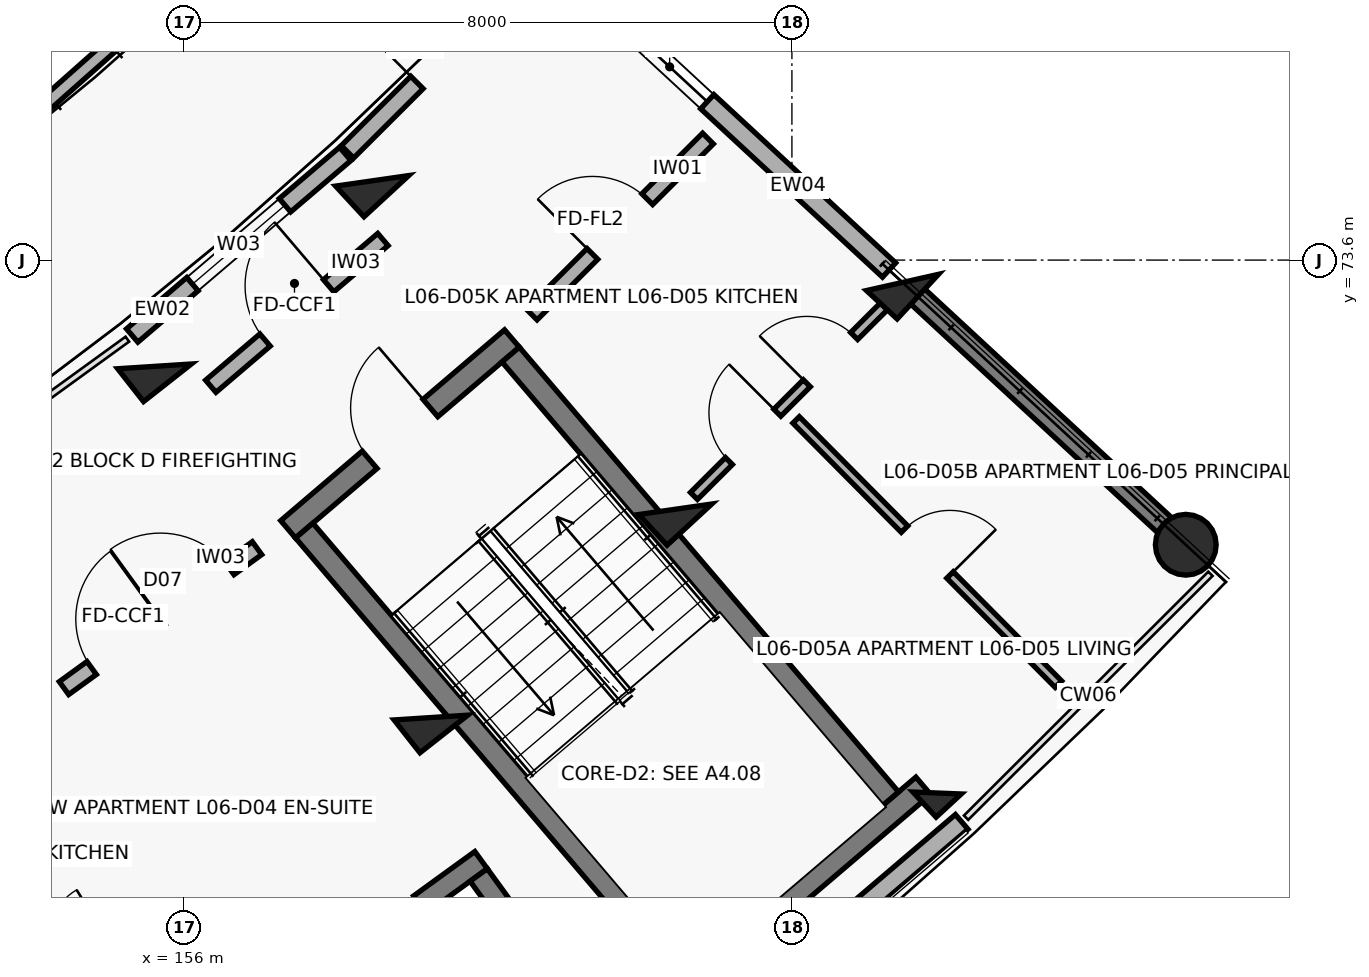
"""IFC4 building model, lengths in metres.
Left out: names, types, materials, properties, quantities, classifications, styles, units other than length and angle.
Written with IfcOpenShell. Run it as: python <this file> out.ifc"""

import sys

from ifc_helpers import new_model, si_unit, direction, frame, frame_2d, origin, origin_2d, place, context, subcontext, project, spatial, rectangle, circle, extrude, element, fill, save


model = new_model("IFC4")
c1 = context("Model", 3, precision=1e-05, world=origin(), true_north=direction((0.0, 1.0)))
c2 = subcontext(c1, "Body", "Model", "MODEL_VIEW")
j1 = project(units=[si_unit("LENGTHUNIT", "METRE"), si_unit("PLANEANGLEUNIT", "RADIAN")], contexts=[c1])
p1 = place(None, origin())
s1 = spatial("IfcSite", under=j1, at=p1, CompositionType="ELEMENT")
p2 = place(p1, origin())
s2 = spatial("IfcBuilding", under=s1, at=p2, CompositionType="ELEMENT")
p3 = place(p2, frame((0.0, 0.0, 20.5)))
s3 = spatial("IfcBuildingStorey", under=s2, at=p3, CompositionType="ELEMENT", Elevation=20.5)
for number, where, z_axis, x_axis in (
    (1, (155.831, 65.101, 0.0), (0.0, 0.0, 1.0), (0.555, -0.832, 0.0)),
    (2, (155.614, 72.202, 0.0), (0.0, 0.0, 1.0), (0.618, -0.786, 0.0)),
    (3, (159.25, 67.581, 0.0), (0.0, 0.0, 1.0), (0.618, -0.786, 0.0)),
    (4, (158.477, 74.643, 0.0), (0.0, 0.0, 1.0), (0.678, -0.735, 0.0)),
    (5, (162.465, 70.322, 0.0), (0.0, 0.0, 1.0), (0.678, -0.735, 0.0)),
):
    element("IfcColumn", number, at=place(p3, frame(where, z_axis=z_axis, x_axis=x_axis)), inside=s3, PredefinedType="COLUMN", context=c2, shape_type="SweptSolid", body=[
        extrude(rectangle(XDim=0.55, YDim=0.8, at=origin_2d()), origin(), (0.0, 0.0, 1.0), 3.1),
    ])
p4 = place(p3, frame((165.91, 66.588, 0.0), z_axis=(0.0, 0.0, 1.0), x_axis=(0.678159669868, -0.73491459515, 0.0)))
e6 = element("IfcColumn", 6, at=p4, inside=s3, PredefinedType="COLUMN", context=c2, shape_type="SweptSolid", body=[
    extrude(rectangle(XDim=0.45, YDim=0.45, at=origin_2d()), origin(), (0.0, 0.0, 1.0), 3.1),
])
p5 = place(p3, frame((165.455, 73.306, 0.0), z_axis=(0.0, 0.0, 1.0), x_axis=(0.733729864503, -0.679441304262, 0.0)))
e7 = element("IfcColumn", 7, at=p5, inside=s3, PredefinedType="COLUMN", context=c2, shape_type="SweptSolid", body=[
    extrude(rectangle(XDim=0.55, YDim=0.8, at=origin_2d()), origin(), (0.0, 0.0, 1.0), 3.1),
])
p6 = place(p3, frame((169.182, 69.854, 0.0), z_axis=(0.0, 0.0, 1.0), x_axis=(0.733729864503, -0.679441304262, 0.0)))
e8 = element("IfcColumn", 8, at=p6, inside=s3, PredefinedType="COLUMN", context=c2, shape_type="SweptSolid", body=[
    extrude(circle(Radius=0.4, at=origin_2d()), origin(), (0.0, 0.0, 1.0), 3.1),
])
p7 = place(p3, frame((165.587, 73.184, 0.0), z_axis=(0.0, 0.0, 1.0), x_axis=(0.733739663667, -0.679430721974, 0.0)))
e9 = element("IfcWall", 9, at=p7, inside=s3, PredefinedType="SHEAR", context=c2, shape_type="SweptSolid", body=[
    extrude(rectangle(XDim=4.72, YDim=0.27, at=frame_2d((2.36, 0.0))), origin(), (0.0, 0.0, 1.0), 2.86),
])
p8 = place(p3, frame((162.716, 63.209, 0.0), z_axis=(0.0, 0.0, 1.0), x_axis=(0.760968923704, 0.64878833001, 0.0)))
e10 = element("IfcWall", 10, at=p8, inside=s3, PredefinedType="SOLIDWALL", context=c2, shape_type="SweptSolid", body=[
    extrude(rectangle(XDim=4.623, YDim=0.255, at=frame_2d((2.311, 0.0))), origin(), (0.0, 0.0, 1.0), 2.25),
])
p9 = place(p3, frame((155.32, 72.608, 0.0), z_axis=(0.0, 0.0, 1.0), x_axis=(0.760985049259, 0.648769415743, 0.0)))
e11 = element("IfcWall", 11, at=p9, inside=s3, PredefinedType="SOLIDWALL", context=c2, shape_type="SweptSolid", body=[
    extrude(rectangle(XDim=3.683, YDim=0.23, at=frame_2d((1.842, 0.0))), origin(), (0.0, 0.0, 1.0), 2.25),
])
p10 = place(p9, frame((1.042, 0.0, 0.32)))
e12 = element("IfcOpeningElement", 12, at=p10, cuts=e11, PredefinedType="OPENING", context=c2, shape_type="SweptSolid", body=[
    extrude(rectangle(XDim=1.6, YDim=1.5, at=frame_2d((0.8, 0.75))), frame((0.0, 0.125, 0.0), z_axis=(0.0, -1.0, 0.0), x_axis=(1.0, 0.0, 0.0)), (0.0, 0.0, 1.0), 0.25),
])
p11 = place(p3, frame((158.153, 75.024, 0.0), z_axis=(0.0, 0.0, 1.0), x_axis=(0.707703076116, 0.706509982984, 0.0)))
e13 = element("IfcWall", 13, at=p11, inside=s3, PredefinedType="SOLIDWALL", context=c2, shape_type="SweptSolid", body=[
    extrude(rectangle(XDim=3.683, YDim=0.23, at=frame_2d((1.842, 0.0))), origin(), (0.0, 0.0, 1.0), 2.25),
])
p12 = place(p11, frame((1.292, 0.0, 0.0)))
e14 = element("IfcOpeningElement", 14, at=p12, cuts=e13, PredefinedType="OPENING", context=c2, shape_type="SweptSolid", body=[
    extrude(rectangle(XDim=1.1, YDim=2.15, at=frame_2d((0.55, 1.075))), frame((0.0, 0.125, 0.0), z_axis=(0.0, -1.0, 0.0), x_axis=(1.0, 0.0, 0.0)), (0.0, 0.0, 1.0), 0.25),
])
p13 = place(p3, frame((161.316, 77.138, 0.0), z_axis=(0.0, 0.0, 1.0), x_axis=(0.733734795505, -0.679435979225, 0.0)))
e15 = element("IfcWall", 15, at=p13, inside=s3, PredefinedType="SOLIDWALL", context=c2, shape_type="SweptSolid", body=[
    extrude(rectangle(XDim=5.4, YDim=0.255, at=frame_2d((2.7, 0.0))), origin(), (0.0, 0.0, 1.0), 2.18),
])
p14 = place(p13, frame((0.79, 0.0, 0.75)))
e16 = element("IfcOpeningElement", 16, at=p14, cuts=e15, PredefinedType="OPENING", context=c2, shape_type="SweptSolid", body=[
    extrude(rectangle(XDim=1.35, YDim=1.35, at=frame_2d((0.675, 0.675))), frame((0.0, 0.137, 0.0), z_axis=(0.0, -1.0, 0.0), x_axis=(1.0, 0.0, 0.0)), (0.0, 0.0, 1.0), 0.275),
])
p15 = place(p3, frame((152.117, 73.82, 0.0), z_axis=(0.0, 0.0, 1.0), x_axis=(0.74809726033, 0.66358909657, 0.0)))
e17 = element("IfcWall", 17, at=p15, inside=s3, PredefinedType="PARAPET", context=c2, shape_type="SweptSolid", body=[
    extrude(rectangle(XDim=8.728, YDim=0.18, at=frame_2d((4.364, 0.0))), origin(), (0.0, 0.0, 1.0), 0.25),
])
p16 = place(p3, frame((157.372, 70.058, 0.0), z_axis=(0.0, 0.0, 1.0), x_axis=(0.760990583254, 0.648762924495, 0.0)))
e18 = element("IfcWall", 18, at=p16, inside=s3, PredefinedType="SHEAR", context=c2, shape_type="SweptSolid", body=[
    extrude(rectangle(XDim=3.87, YDim=0.3, at=frame_2d((1.935, 0.0))), origin(), (0.0, 0.0, 1.0), 3.1),
])
p17 = place(p16, frame((1.41, 0.0, 0.0)))
e19 = element("IfcOpeningElement", 19, at=p17, cuts=e18, PredefinedType="OPENING", context=c2, shape_type="SweptSolid", body=[
    extrude(rectangle(XDim=1.05, YDim=2.15, at=frame_2d((0.525, 1.075))), frame((0.0, 0.16, 0.0), z_axis=(0.0, -1.0, 0.0), x_axis=(1.0, 0.0, 0.0)), (0.0, 0.0, 1.0), 0.32),
])
p18 = place(p3, frame((162.327, 63.783, 0.0), z_axis=(0.0, 0.0, 1.0), x_axis=(0.760969560012, 0.648787583678, 0.0)))
e20 = element("IfcWall", 20, at=p18, inside=s3, PredefinedType="SHEAR", context=c2, shape_type="SweptSolid", body=[
    extrude(rectangle(XDim=4.47, YDim=0.3, at=frame_2d((2.235, 0.0))), origin(), (0.0, 0.0, 1.0), 3.1),
])
p19 = place(p3, frame((157.583, 70.041, 0.0), z_axis=(0.0, 0.0, 1.0), x_axis=(0.648762810187, -0.760990680704, 0.0)))
e21 = element("IfcWall", 21, at=p19, inside=s3, PredefinedType="SHEAR", context=c2, shape_type="SweptSolid", body=[
    extrude(rectangle(XDim=7.69, YDim=0.3, at=frame_2d((3.845, 0.0))), origin(), (0.0, 0.0, 1.0), 3.1),
])
p20 = place(p3, frame((160.3, 72.357, 0.0), z_axis=(0.0, 0.0, 1.0), x_axis=(0.648781194888, -0.760975006922, 0.0)))
e22 = element("IfcWall", 22, at=p20, inside=s3, PredefinedType="SHEAR", context=c2, shape_type="SweptSolid", body=[
    extrude(rectangle(XDim=7.69, YDim=0.3, at=frame_2d((3.845, 0.0))), origin(), (0.0, 0.0, 1.0), 3.1),
])
p21 = place(p3, frame((157.409, 63.89, 0.0), z_axis=(0.0, 0.0, 1.0), x_axis=(0.809510936031, 0.587104798521, 0.0)))
e23 = element("IfcWall", 23, at=p21, inside=s3, PredefinedType="SHEAR", context=c2, shape_type="SweptSolid", body=[
    extrude(rectangle(XDim=3.09, YDim=0.28, at=frame_2d((1.545, 0.0))), origin(), (0.0, 0.0, 1.0), 3.1),
])
p22 = place(p21, frame((0.995, 0.0, 0.0)))
e24 = element("IfcOpeningElement", 24, at=p22, cuts=e23, PredefinedType="OPENING", context=c2, shape_type="SweptSolid", body=[
    extrude(rectangle(XDim=1.1, YDim=2.15, at=frame_2d((0.55, 1.075))), frame((0.0, 0.15, 0.0), z_axis=(0.0, -1.0, 0.0), x_axis=(1.0, 0.0, 0.0)), (0.0, 0.0, 1.0), 0.3),
])
p23 = place(p3, frame((159.879, 65.509, 0.0), z_axis=(0.0, 0.0, 1.0), x_axis=(0.58704837408, -0.809551855344, 0.0)))
e25 = element("IfcWall", 25, at=p23, inside=s3, PredefinedType="SHEAR", context=c2, shape_type="SweptSolid", body=[
    extrude(rectangle(XDim=2.03, YDim=0.28, at=frame_2d((1.015, 0.0))), origin(), (0.0, 0.0, 1.0), 3.1),
])
p24 = place(p3, frame((154.423, 67.968, 0.0), z_axis=(0.0, 0.0, 1.0), x_axis=(0.809516127005, 0.587097641043, 0.0)))
e26 = element("IfcWall", 26, at=p24, inside=s3, PredefinedType="SOLIDWALL", context=c2, shape_type="SweptSolid", body=[
    extrude(rectangle(XDim=3.137, YDim=0.21, at=frame_2d((1.569, 0.0))), origin(), (0.0, 0.0, 1.0), 2.08),
])
p25 = place(p24, frame((0.45, 0.0, 0.0)))
e27 = element("IfcOpeningElement", 27, at=p25, cuts=e26, PredefinedType="OPENING", context=c2, shape_type="SweptSolid", body=[
    extrude(rectangle(XDim=1.1, YDim=2.15, at=frame_2d((0.55, 1.075))), frame((0.0, 0.115, 0.0), z_axis=(0.0, -1.0, 0.0), x_axis=(1.0, 0.0, 0.0)), (0.0, 0.0, 1.0), 0.23),
])
p26 = place(p24, frame((1.567, 0.0, 0.0)))
e28 = element("IfcOpeningElement", 28, at=p26, cuts=e26, PredefinedType="OPENING", context=c2, shape_type="SweptSolid", body=[
    extrude(rectangle(XDim=1.12, YDim=2.15, at=frame_2d((0.56, 1.075))), frame((0.0, 0.115, 0.0), z_axis=(0.0, -1.0, 0.0), x_axis=(1.0, 0.0, 0.0)), (0.0, 0.0, 1.0), 0.23),
])
p27 = place(p3, frame((156.354, 71.94, 0.0), z_axis=(0.0, 0.0, 1.0), x_axis=(0.760991187621, 0.648762215579, 0.0)))
e29 = element("IfcWall", 29, at=p27, inside=s3, PredefinedType="SOLIDWALL", context=c2, shape_type="SweptSolid", body=[
    extrude(rectangle(XDim=2.976, YDim=0.21, at=frame_2d((1.488, 0.0))), origin(), (0.0, 0.0, 1.0), 2.08),
])
p28 = place(p27, frame((0.938, 0.0, 0.0)))
e30 = element("IfcOpeningElement", 30, at=p28, cuts=e29, PredefinedType="OPENING", context=c2, shape_type="SweptSolid", body=[
    extrude(rectangle(XDim=1.1, YDim=2.15, at=frame_2d((0.55, 1.075))), frame((0.0, 0.115, 0.0), z_axis=(0.0, -1.0, 0.0), x_axis=(1.0, 0.0, 0.0)), (0.0, 0.0, 1.0), 0.23),
])
p29 = place(p3, frame((160.576, 72.884, 0.0), z_axis=(0.0, 0.0, 1.0), x_axis=(0.70773973846, 0.706473256822, 0.0)))
e31 = element("IfcWall", 31, at=p29, inside=s3, PredefinedType="SOLIDWALL", context=c2, shape_type="SweptSolid", body=[
    extrude(rectangle(XDim=3.277, YDim=0.2, at=frame_2d((1.639, 0.0))), origin(), (0.0, 0.0, 1.0), 2.08),
])
p30 = place(p29, frame((1.128, 0.0, 0.0)))
e32 = element("IfcOpeningElement", 32, at=p30, cuts=e31, PredefinedType="OPENING", context=c2, shape_type="SweptSolid", body=[
    extrude(rectangle(XDim=1.02, YDim=2.15, at=frame_2d((0.51, 1.075))), frame((0.0, 0.11, 0.0), z_axis=(0.0, -1.0, 0.0), x_axis=(1.0, 0.0, 0.0)), (0.0, 0.0, 1.0), 0.22),
])
p31 = place(p3, frame((162.711, 70.497, 0.0), z_axis=(0.0, 0.0, 1.0), x_axis=(0.70774573777, 0.706467246706, 0.0)))
e33 = element("IfcWall", 33, at=p31, inside=s3, PredefinedType="PARTITIONING", context=c2, shape_type="SweptSolid", body=[
    extrude(rectangle(XDim=3.628, YDim=0.13, at=frame_2d((1.814, 0.0))), origin(), (0.0, 0.0, 1.0), 2.08),
])
p32 = place(p31, frame((0.65, 0.0, 0.0)))
e34 = element("IfcOpeningElement", 34, at=p32, cuts=e33, PredefinedType="OPENING", context=c2, shape_type="SweptSolid", body=[
    extrude(rectangle(XDim=0.9, YDim=2.1, at=frame_2d((0.45, 1.05))), frame((0.0, 0.075, 0.0), z_axis=(0.0, -1.0, 0.0), x_axis=(1.0, 0.0, 0.0)), (0.0, 0.0, 1.0), 0.15),
])
p33 = place(p31, frame((2.098, 0.0, 0.0)))
e35 = element("IfcOpeningElement", 35, at=p33, cuts=e33, PredefinedType="OPENING", context=c2, shape_type="SweptSolid", body=[
    extrude(rectangle(XDim=0.88, YDim=2.1, at=frame_2d((0.44, 1.05))), frame((0.0, 0.075, 0.0), z_axis=(0.0, -1.0, 0.0), x_axis=(1.0, 0.0, 0.0)), (0.0, 0.0, 1.0), 0.15),
])
p34 = place(p3, frame((164.055, 71.497, 0.0), z_axis=(0.0, 0.0, 1.0), x_axis=(0.704461179749, -0.709742521078, 0.0)))
e36 = element("IfcWall", 36, at=p34, inside=s3, PredefinedType="PARTITIONING", context=c2, shape_type="SweptSolid", body=[
    extrude(rectangle(XDim=4.9, YDim=0.12, at=frame_2d((2.45, 0.0))), origin(), (0.0, 0.0, 1.0), 2.08),
])
p35 = place(p34, frame((2.025, 0.0, 0.0)))
e37 = element("IfcOpeningElement", 37, at=p35, cuts=e36, PredefinedType="OPENING", context=c2, shape_type="SweptSolid", body=[
    extrude(rectangle(XDim=0.85, YDim=2.1, at=frame_2d((0.425, 1.05))), frame((0.0, 0.07, 0.0), z_axis=(0.0, -1.0, 0.0), x_axis=(1.0, 0.0, 0.0)), (0.0, 0.0, 1.0), 0.14),
])
p36 = place(p10, origin())
e38 = element("IfcWindow", 38, at=p36, inside=s3, PartitioningType="DOUBLE_PANEL_VERTICAL", PredefinedType="WINDOW", context=c2, shape_type="SweptSolid", body=[
    extrude(rectangle(XDim=1.6, YDim=1.5, at=frame_2d((0.8, 0.75))), frame((0.0, 0.03, 0.0), z_axis=(0.0, -1.0, 0.0), x_axis=(1.0, 0.0, 0.0)), (0.0, 0.0, 1.0), 0.06),
])
fill(e12, e38)
p37 = place(p12, origin())
e39 = element("IfcDoor", 39, at=p37, inside=s3, OperationType="SINGLE_SWING_LEFT", PredefinedType="DOOR", context=c2, shape_type="SweptSolid", body=[
    extrude(rectangle(XDim=1.1, YDim=2.15, at=frame_2d((0.55, 1.075))), frame((0.0, 0.025, 0.0), z_axis=(0.0, -1.0, 0.0), x_axis=(1.0, 0.0, 0.0)), (0.0, 0.0, 1.0), 0.05),
])
fill(e14, e39)
p38 = place(p14, origin())
e40 = element("IfcWindow", 40, at=p38, inside=s3, PartitioningType="DOUBLE_PANEL_VERTICAL", PredefinedType="WINDOW", context=c2, shape_type="SweptSolid", body=[
    extrude(rectangle(XDim=1.35, YDim=1.35, at=frame_2d((0.675, 0.675))), frame((0.0, 0.03, 0.0), z_axis=(0.0, -1.0, 0.0), x_axis=(1.0, 0.0, 0.0)), (0.0, 0.0, 1.0), 0.06),
])
fill(e16, e40)
p39 = place(p17, origin())
e41 = element("IfcDoor", 41, at=p39, inside=s3, OperationType="SINGLE_SWING_RIGHT", PredefinedType="DOOR", context=c2, shape_type="SweptSolid", body=[
    extrude(rectangle(XDim=1.05, YDim=2.15, at=frame_2d((0.525, 1.075))), frame((0.0, 0.025, 0.0), z_axis=(0.0, -1.0, 0.0), x_axis=(1.0, 0.0, 0.0)), (0.0, 0.0, 1.0), 0.05),
])
fill(e19, e41)
p40 = place(p25, origin())
e42 = element("IfcDoor", 42, at=p40, inside=s3, OperationType="SINGLE_SWING_RIGHT", PredefinedType="DOOR", context=c2, shape_type="SweptSolid", body=[
    extrude(rectangle(XDim=1.1, YDim=2.15, at=frame_2d((0.55, 1.075))), frame((0.0, 0.025, 0.0), z_axis=(0.0, -1.0, 0.0), x_axis=(1.0, 0.0, 0.0)), (0.0, 0.0, 1.0), 0.05),
])
fill(e27, e42)
p41 = place(p26, origin())
e43 = element("IfcDoor", 43, at=p41, inside=s3, OperationType="SINGLE_SWING_LEFT", PredefinedType="DOOR", context=c2, shape_type="SweptSolid", body=[
    extrude(rectangle(XDim=1.12, YDim=2.15, at=frame_2d((0.56, 1.075))), frame((0.0, 0.025, 0.0), z_axis=(0.0, -1.0, 0.0), x_axis=(1.0, 0.0, 0.0)), (0.0, 0.0, 1.0), 0.05),
])
fill(e28, e43)
p42 = place(p28, origin())
e44 = element("IfcDoor", 44, at=p42, inside=s3, OperationType="SINGLE_SWING_RIGHT", PredefinedType="DOOR", context=c2, shape_type="SweptSolid", body=[
    extrude(rectangle(XDim=1.1, YDim=2.15, at=frame_2d((0.55, 1.075))), frame((0.0, 0.025, 0.0), z_axis=(0.0, -1.0, 0.0), x_axis=(1.0, 0.0, 0.0)), (0.0, 0.0, 1.0), 0.05),
])
fill(e30, e44)
p43 = place(p30, origin())
e45 = element("IfcDoor", 45, at=p43, inside=s3, OperationType="SINGLE_SWING_LEFT", PredefinedType="DOOR", context=c2, shape_type="SweptSolid", body=[
    extrude(rectangle(XDim=1.02, YDim=2.15, at=frame_2d((0.51, 1.075))), frame((0.0, 0.025, 0.0), z_axis=(0.0, -1.0, 0.0), x_axis=(1.0, 0.0, 0.0)), (0.0, 0.0, 1.0), 0.05),
])
fill(e32, e45)
p44 = place(p32, origin())
e46 = element("IfcDoor", 46, at=p44, inside=s3, OperationType="SINGLE_SWING_RIGHT", PredefinedType="DOOR", context=c2, shape_type="SweptSolid", body=[
    extrude(rectangle(XDim=0.9, YDim=2.1, at=frame_2d((0.45, 1.05))), frame((0.0, 0.025, 0.0), z_axis=(0.0, -1.0, 0.0), x_axis=(1.0, 0.0, 0.0)), (0.0, 0.0, 1.0), 0.05),
])
fill(e34, e46)
p45 = place(p33, origin())
e47 = element("IfcDoor", 47, at=p45, inside=s3, OperationType="SINGLE_SWING_LEFT", PredefinedType="DOOR", context=c2, shape_type="SweptSolid", body=[
    extrude(rectangle(XDim=0.88, YDim=2.1, at=frame_2d((0.44, 1.05))), frame((0.0, 0.025, 0.0), z_axis=(0.0, -1.0, 0.0), x_axis=(1.0, 0.0, 0.0)), (0.0, 0.0, 1.0), 0.05),
])
fill(e35, e47)
p46 = place(p35, origin())
e48 = element("IfcDoor", 48, at=p46, inside=s3, OperationType="SINGLE_SWING_RIGHT", PredefinedType="DOOR", context=c2, shape_type="SweptSolid", body=[
    extrude(rectangle(XDim=0.85, YDim=2.1, at=frame_2d((0.425, 1.05))), frame((0.0, 0.025, 0.0), z_axis=(0.0, -1.0, 0.0), x_axis=(1.0, 0.0, 0.0)), (0.0, 0.0, 1.0), 0.05),
])
fill(e37, e48)
save(model, sys.argv[1])
